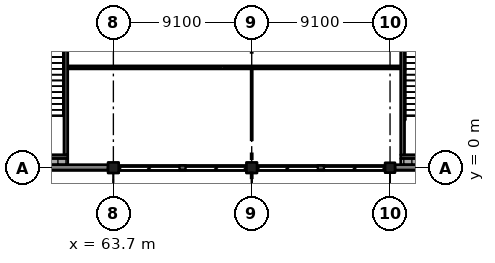
"""IFC4 building model, lengths in metres.
Left out: names, types, materials, properties, quantities, classifications, styles, units other than length and angle.
Written with IfcOpenShell. Run it as: python <this file> out.ifc"""

import sys

from ifc_helpers import new_model, si_unit, direction, frame, frame_2d, origin, origin_2d, place, context, subcontext, project, spatial, rectangle, extrude, element, fill, save


model = new_model("IFC4")
c1 = context("Model", 3, precision=1e-05, world=origin(), true_north=direction((0.0, 1.0)))
c2 = subcontext(c1, "Body", "Model", "MODEL_VIEW")
j1 = project(units=[si_unit("LENGTHUNIT", "METRE"), si_unit("PLANEANGLEUNIT", "RADIAN")], contexts=[c1])
p1 = place(None, origin())
s1 = spatial("IfcSite", under=j1, at=p1, CompositionType="ELEMENT")
p2 = place(p1, origin())
s2 = spatial("IfcBuilding", under=s1, at=p2, CompositionType="ELEMENT")
p3 = place(p2, origin())
s3 = spatial("IfcBuildingStorey", under=s2, at=p3, CompositionType="ELEMENT", Elevation=0.0)
for number, where, z_axis, x_axis in (
    (1, (63.7, 0.0, -0.4), (0.0, 0.0, 1.0), (1.0, 0.0, 0.0)),
    (2, (72.8, 0.0, -0.4), (0.0, 0.0, 1.0), (1.0, 0.0, 0.0)),
):
    element("IfcColumn", number, at=place(p3, frame(where, z_axis=z_axis, x_axis=x_axis)), inside=s3, PredefinedType="COLUMN", context=c2, shape_type="SweptSolid", body=[
        extrude(rectangle(XDim=0.7, YDim=0.7, at=origin_2d()), origin(), (0.0, 0.0, 1.0), 6.77),
    ])
p4 = place(p3, frame((81.9, 0.0, -0.4), z_axis=(0.0, 0.0, 1.0), x_axis=(1.0, 0.0, 0.0)))
e3 = element("IfcColumn", 3, at=p4, inside=s3, PredefinedType="COLUMN", context=c2, shape_type="SweptSolid", body=[
    extrude(rectangle(XDim=0.65, YDim=0.65, at=origin_2d()), origin(), (0.0, 0.0, 1.0), 6.77),
])
p5 = place(p3, frame((60.7, 0.725, -0.4), z_axis=(0.0, 0.0, 1.0), x_axis=(-1.0, 0.0, 0.0)))
e4 = element("IfcWall", 4, at=p5, inside=s3, PredefinedType="SHEAR", context=c2, shape_type="SweptSolid", body=[
    extrude(rectangle(XDim=5.4, YDim=0.25, at=frame_2d((2.7, 0.0))), origin(), (0.0, 0.0, 1.0), 6.77),
])
p6 = place(p3, frame((60.575, 10.45, -0.4), z_axis=(0.0, 0.0, 1.0), x_axis=(0.0, -1.0, 0.0)))
e5 = element("IfcWall", 5, at=p6, inside=s3, PredefinedType="SHEAR", context=c2, shape_type="SweptSolid", body=[
    extrude(rectangle(XDim=9.6, YDim=0.25, at=frame_2d((4.8, 0.0))), origin(), (0.0, 0.0, 1.0), 6.77),
])
p7 = place(p3, frame((88.0, 0.725, -0.4), z_axis=(0.0, 0.0, 1.0), x_axis=(-1.0, 0.0, 0.0)))
e6 = element("IfcWall", 6, at=p7, inside=s3, PredefinedType="SHEAR", context=c2, shape_type="SweptSolid", body=[
    extrude(rectangle(XDim=5.4, YDim=0.25, at=frame_2d((2.7, 0.0))), origin(), (0.0, 0.0, 1.0), 6.77),
])
p8 = place(p3, frame((82.725, 10.45, -0.4), z_axis=(0.0, 0.0, 1.0), x_axis=(0.0, -1.0, 0.0)))
e7 = element("IfcWall", 7, at=p8, inside=s3, PredefinedType="SHEAR", context=c2, shape_type="SweptSolid", body=[
    extrude(rectangle(XDim=9.6, YDim=0.25, at=frame_2d((4.8, 0.0))), origin(), (0.0, 0.0, 1.0), 6.77),
])
p9 = place(p3, frame((54.925, 0.025, 0.0), z_axis=(0.0, 0.0, 1.0), x_axis=(1.0, 0.0, 0.0)))
e8 = element("IfcWall", 8, at=p9, inside=s3, PredefinedType="SOLIDWALL", context=c2, shape_type="SweptSolid", body=[
    extrude(rectangle(XDim=8.425, YDim=0.35, at=frame_2d((4.212, 0.0))), origin(), (0.0, 0.0, 1.0), 5.27),
])
p10 = place(p3, frame((64.05, 0.0, 0.0), z_axis=(0.0, 0.0, 1.0), x_axis=(1.0, 0.0, 0.0)))
e9 = element("IfcWall", 9, at=p10, inside=s3, PredefinedType="SOLIDWALL", context=c2, shape_type="SweptSolid", body=[
    extrude(rectangle(XDim=8.4, YDim=0.3, at=frame_2d((4.2, 0.0))), origin(), (0.0, 0.0, 1.0), 3.75),
])
p11 = place(p10, frame((0.385, 0.0, 0.0)))
e10 = element("IfcOpeningElement", 10, at=p11, cuts=e9, PredefinedType="OPENING", context=c2, shape_type="SweptSolid", body=[
    extrude(rectangle(XDim=3.6, YDim=2.7, at=frame_2d((1.8, 1.35))), frame((0.0, 0.16, 0.0), z_axis=(0.0, -1.0, 0.0), x_axis=(1.0, 0.0, 0.0)), (0.0, 0.0, 1.0), 0.32),
])
p12 = place(p10, frame((4.415, 0.0, 0.0)))
e11 = element("IfcOpeningElement", 11, at=p12, cuts=e9, PredefinedType="OPENING", context=c2, shape_type="SweptSolid", body=[
    extrude(rectangle(XDim=3.6, YDim=2.7, at=frame_2d((1.8, 1.35))), frame((0.0, 0.16, 0.0), z_axis=(0.0, -1.0, 0.0), x_axis=(1.0, 0.0, 0.0)), (0.0, 0.0, 1.0), 0.32),
])
p13 = place(p3, frame((68.035, 0.0, 3.75), z_axis=(0.0, 0.0, 1.0), x_axis=(1.0, 0.0, 0.0)))
e12 = element("IfcWall", 12, at=p13, inside=s3, PredefinedType="SOLIDWALL", context=c2, shape_type="SweptSolid", body=[
    extrude(rectangle(XDim=0.43, YDim=0.3, at=frame_2d((0.215, 0.0))), origin(), (0.0, 0.0, 1.0), 1.57),
])
p14 = place(p3, frame((73.15, 0.0, 0.0), z_axis=(0.0, 0.0, 1.0), x_axis=(1.0, 0.0, 0.0)))
e13 = element("IfcWall", 13, at=p14, inside=s3, PredefinedType="SOLIDWALL", context=c2, shape_type="SweptSolid", body=[
    extrude(rectangle(XDim=8.425, YDim=0.3, at=frame_2d((4.212, 0.0))), origin(), (0.0, 0.0, 1.0), 3.75),
])
p15 = place(p14, frame((0.385, 0.0, 0.0)))
e14 = element("IfcOpeningElement", 14, at=p15, cuts=e13, PredefinedType="OPENING", context=c2, shape_type="SweptSolid", body=[
    extrude(rectangle(XDim=3.6, YDim=2.7, at=frame_2d((1.8, 1.35))), frame((0.0, 0.16, 0.0), z_axis=(0.0, -1.0, 0.0), x_axis=(1.0, 0.0, 0.0)), (0.0, 0.0, 1.0), 0.32),
])
p16 = place(p14, frame((4.415, 0.0, 0.0)))
e15 = element("IfcOpeningElement", 15, at=p16, cuts=e13, PredefinedType="OPENING", context=c2, shape_type="SweptSolid", body=[
    extrude(rectangle(XDim=3.6, YDim=2.7, at=frame_2d((1.8, 1.35))), frame((0.0, 0.16, 0.0), z_axis=(0.0, -1.0, 0.0), x_axis=(1.0, 0.0, 0.0)), (0.0, 0.0, 1.0), 0.32),
])
p17 = place(p3, frame((77.135, 0.0, 3.75), z_axis=(0.0, 0.0, 1.0), x_axis=(1.0, 0.0, 0.0)))
e16 = element("IfcWall", 16, at=p17, inside=s3, PredefinedType="SOLIDWALL", context=c2, shape_type="SweptSolid", body=[
    extrude(rectangle(XDim=0.43, YDim=0.3, at=frame_2d((0.215, 0.0))), origin(), (0.0, 0.0, 1.0), 1.52),
])
p18 = place(p3, frame((82.225, 0.025, 0.0), z_axis=(0.0, 0.0, 1.0), x_axis=(1.0, 0.0, 0.0)))
e17 = element("IfcWall", 17, at=p18, inside=s3, PredefinedType="SOLIDWALL", context=c2, shape_type="SweptSolid", body=[
    extrude(rectangle(XDim=8.425, YDim=0.35, at=frame_2d((4.212, 0.0))), origin(), (0.0, 0.0, 1.0), 5.27),
])
for number, where, z_axis, x_axis in (
    (18, (55.3, 0.4, 0.0), (0.0, 0.0, 1.0), (1.0, 0.0, 0.0)),
    (19, (82.6, 0.4, 0.0), (0.0, 0.0, 1.0), (1.0, 0.0, 0.0)),
):
    element("IfcWall", number, at=place(p3, frame(where, z_axis=z_axis, x_axis=x_axis)), inside=s3, PredefinedType="SOLIDWALL", context=c2, shape_type="SweptSolid", body=[
        extrude(rectangle(XDim=5.4, YDim=0.4, at=frame_2d((2.7, 0.0))), origin(), (0.0, 0.0, 1.0), 6.02),
    ])
p19 = place(p3, frame((82.57, 6.6, 0.0), z_axis=(0.0, 0.0, 1.0), x_axis=(-1.0, 0.0, 0.0)))
e20 = element("IfcWall", 20, at=p19, inside=s3, PredefinedType="PARTITIONING", context=c2, shape_type="SweptSolid", body=[
    extrude(rectangle(XDim=21.84, YDim=0.2, at=frame_2d((10.92, 0.0))), origin(), (0.0, 0.0, 1.0), 6.02),
])
p20 = place(p19, frame((0.65, 0.0, 0.0)))
e21 = element("IfcOpeningElement", 21, at=p20, cuts=e20, PredefinedType="OPENING", context=c2, shape_type="SweptSolid", body=[
    extrude(rectangle(XDim=1.8, YDim=2.4, at=frame_2d((0.9, 1.2))), frame((0.0, 0.11, 0.0), z_axis=(0.0, -1.0, 0.0), x_axis=(1.0, 0.0, 0.0)), (0.0, 0.0, 1.0), 0.22),
])
p21 = place(p19, frame((3.75, 0.0, 0.0)))
e22 = element("IfcOpeningElement", 22, at=p21, cuts=e20, PredefinedType="OPENING", context=c2, shape_type="SweptSolid", body=[
    extrude(rectangle(XDim=1.8, YDim=2.4, at=frame_2d((0.9, 1.2))), frame((0.0, 0.11, 0.0), z_axis=(0.0, -1.0, 0.0), x_axis=(1.0, 0.0, 0.0)), (0.0, 0.0, 1.0), 0.22),
])
p22 = place(p19, frame((6.95, 0.0, 0.0)))
e23 = element("IfcOpeningElement", 23, at=p22, cuts=e20, PredefinedType="OPENING", context=c2, shape_type="SweptSolid", body=[
    extrude(rectangle(XDim=1.8, YDim=2.4, at=frame_2d((0.9, 1.2))), frame((0.0, 0.11, 0.0), z_axis=(0.0, -1.0, 0.0), x_axis=(1.0, 0.0, 0.0)), (0.0, 0.0, 1.0), 0.22),
])
p23 = place(p19, frame((10.05, 0.0, 0.0)))
e24 = element("IfcOpeningElement", 24, at=p23, cuts=e20, PredefinedType="OPENING", context=c2, shape_type="SweptSolid", body=[
    extrude(rectangle(XDim=1.8, YDim=2.4, at=frame_2d((0.9, 1.2))), frame((0.0, 0.11, 0.0), z_axis=(0.0, -1.0, 0.0), x_axis=(1.0, 0.0, 0.0)), (0.0, 0.0, 1.0), 0.22),
])
p24 = place(p19, frame((13.15, 0.0, 0.0)))
e25 = element("IfcOpeningElement", 25, at=p24, cuts=e20, PredefinedType="OPENING", context=c2, shape_type="SweptSolid", body=[
    extrude(rectangle(XDim=1.8, YDim=2.4, at=frame_2d((0.9, 1.2))), frame((0.0, 0.11, 0.0), z_axis=(0.0, -1.0, 0.0), x_axis=(1.0, 0.0, 0.0)), (0.0, 0.0, 1.0), 0.22),
])
p25 = place(p19, frame((16.25, 0.0, 0.0)))
e26 = element("IfcOpeningElement", 26, at=p25, cuts=e20, PredefinedType="OPENING", context=c2, shape_type="SweptSolid", body=[
    extrude(rectangle(XDim=1.8, YDim=2.4, at=frame_2d((0.9, 1.2))), frame((0.0, 0.11, 0.0), z_axis=(0.0, -1.0, 0.0), x_axis=(1.0, 0.0, 0.0)), (0.0, 0.0, 1.0), 0.22),
])
p26 = place(p19, frame((19.35, 0.0, 0.0)))
e27 = element("IfcOpeningElement", 27, at=p26, cuts=e20, PredefinedType="OPENING", context=c2, shape_type="SweptSolid", body=[
    extrude(rectangle(XDim=1.8, YDim=2.4, at=frame_2d((0.9, 1.2))), frame((0.0, 0.11, 0.0), z_axis=(0.0, -1.0, 0.0), x_axis=(1.0, 0.0, 0.0)), (0.0, 0.0, 1.0), 0.22),
])
p27 = place(p11, frame((3.6, 0.0, 0.0), z_axis=(0.0, 0.0, 1.0), x_axis=(-1.0, 0.0, 0.0)))
e28 = element("IfcDoor", 28, at=p27, inside=s3, OperationType="DOUBLE_DOOR_SINGLE_SWING", PredefinedType="DOOR", context=c2, shape_type="SweptSolid", body=[
    extrude(rectangle(XDim=3.6, YDim=2.7, at=frame_2d((1.8, 1.35))), frame((0.0, 0.025, 0.0), z_axis=(0.0, -1.0, 0.0), x_axis=(1.0, 0.0, 0.0)), (0.0, 0.0, 1.0), 0.05),
])
fill(e10, e28)
p28 = place(p12, frame((3.6, 0.0, 0.0), z_axis=(0.0, 0.0, 1.0), x_axis=(-1.0, 0.0, 0.0)))
e29 = element("IfcDoor", 29, at=p28, inside=s3, OperationType="DOUBLE_DOOR_SINGLE_SWING", PredefinedType="DOOR", context=c2, shape_type="SweptSolid", body=[
    extrude(rectangle(XDim=3.6, YDim=2.7, at=frame_2d((1.8, 1.35))), frame((0.0, 0.025, 0.0), z_axis=(0.0, -1.0, 0.0), x_axis=(1.0, 0.0, 0.0)), (0.0, 0.0, 1.0), 0.05),
])
fill(e11, e29)
p29 = place(p15, frame((3.6, 0.0, 0.0), z_axis=(0.0, 0.0, 1.0), x_axis=(-1.0, 0.0, 0.0)))
e30 = element("IfcDoor", 30, at=p29, inside=s3, OperationType="DOUBLE_DOOR_SINGLE_SWING", PredefinedType="DOOR", context=c2, shape_type="SweptSolid", body=[
    extrude(rectangle(XDim=3.6, YDim=2.7, at=frame_2d((1.8, 1.35))), frame((0.0, 0.025, 0.0), z_axis=(0.0, -1.0, 0.0), x_axis=(1.0, 0.0, 0.0)), (0.0, 0.0, 1.0), 0.05),
])
fill(e14, e30)
p30 = place(p16, frame((3.6, 0.0, 0.0), z_axis=(0.0, 0.0, 1.0), x_axis=(-1.0, 0.0, 0.0)))
e31 = element("IfcDoor", 31, at=p30, inside=s3, OperationType="DOUBLE_DOOR_SINGLE_SWING", PredefinedType="DOOR", context=c2, shape_type="SweptSolid", body=[
    extrude(rectangle(XDim=3.6, YDim=2.7, at=frame_2d((1.8, 1.35))), frame((0.0, 0.025, 0.0), z_axis=(0.0, -1.0, 0.0), x_axis=(1.0, 0.0, 0.0)), (0.0, 0.0, 1.0), 0.05),
])
fill(e15, e31)
p31 = place(p20, origin())
e32 = element("IfcDoor", 32, at=p31, inside=s3, OperationType="DOUBLE_DOOR_SINGLE_SWING", PredefinedType="DOOR", context=c2, shape_type="SweptSolid", body=[
    extrude(rectangle(XDim=1.8, YDim=2.4, at=frame_2d((0.9, 1.2))), frame((0.0, 0.025, 0.0), z_axis=(0.0, -1.0, 0.0), x_axis=(1.0, 0.0, 0.0)), (0.0, 0.0, 1.0), 0.05),
])
fill(e21, e32)
p32 = place(p21, origin())
e33 = element("IfcDoor", 33, at=p32, inside=s3, OperationType="DOUBLE_DOOR_SINGLE_SWING", PredefinedType="DOOR", context=c2, shape_type="SweptSolid", body=[
    extrude(rectangle(XDim=1.8, YDim=2.4, at=frame_2d((0.9, 1.2))), frame((0.0, 0.025, 0.0), z_axis=(0.0, -1.0, 0.0), x_axis=(1.0, 0.0, 0.0)), (0.0, 0.0, 1.0), 0.05),
])
fill(e22, e33)
p33 = place(p22, origin())
e34 = element("IfcDoor", 34, at=p33, inside=s3, OperationType="DOUBLE_DOOR_SINGLE_SWING", PredefinedType="DOOR", context=c2, shape_type="SweptSolid", body=[
    extrude(rectangle(XDim=1.8, YDim=2.4, at=frame_2d((0.9, 1.2))), frame((0.0, 0.025, 0.0), z_axis=(0.0, -1.0, 0.0), x_axis=(1.0, 0.0, 0.0)), (0.0, 0.0, 1.0), 0.05),
])
fill(e23, e34)
p34 = place(p23, origin())
e35 = element("IfcDoor", 35, at=p34, inside=s3, OperationType="DOUBLE_DOOR_SINGLE_SWING", PredefinedType="DOOR", context=c2, shape_type="SweptSolid", body=[
    extrude(rectangle(XDim=1.8, YDim=2.4, at=frame_2d((0.9, 1.2))), frame((0.0, 0.025, 0.0), z_axis=(0.0, -1.0, 0.0), x_axis=(1.0, 0.0, 0.0)), (0.0, 0.0, 1.0), 0.05),
])
fill(e24, e35)
p35 = place(p24, origin())
e36 = element("IfcDoor", 36, at=p35, inside=s3, OperationType="DOUBLE_DOOR_SINGLE_SWING", PredefinedType="DOOR", context=c2, shape_type="SweptSolid", body=[
    extrude(rectangle(XDim=1.8, YDim=2.4, at=frame_2d((0.9, 1.2))), frame((0.0, 0.025, 0.0), z_axis=(0.0, -1.0, 0.0), x_axis=(1.0, 0.0, 0.0)), (0.0, 0.0, 1.0), 0.05),
])
fill(e25, e36)
p36 = place(p25, origin())
e37 = element("IfcDoor", 37, at=p36, inside=s3, OperationType="DOUBLE_DOOR_SINGLE_SWING", PredefinedType="DOOR", context=c2, shape_type="SweptSolid", body=[
    extrude(rectangle(XDim=1.8, YDim=2.4, at=frame_2d((0.9, 1.2))), frame((0.0, 0.025, 0.0), z_axis=(0.0, -1.0, 0.0), x_axis=(1.0, 0.0, 0.0)), (0.0, 0.0, 1.0), 0.05),
])
fill(e26, e37)
p37 = place(p26, origin())
e38 = element("IfcDoor", 38, at=p37, inside=s3, OperationType="DOUBLE_DOOR_SINGLE_SWING", PredefinedType="DOOR", context=c2, shape_type="SweptSolid", body=[
    extrude(rectangle(XDim=1.8, YDim=2.4, at=frame_2d((0.9, 1.2))), frame((0.0, 0.025, 0.0), z_axis=(0.0, -1.0, 0.0), x_axis=(1.0, 0.0, 0.0)), (0.0, 0.0, 1.0), 0.05),
])
fill(e27, e38)
save(model, sys.argv[1])
